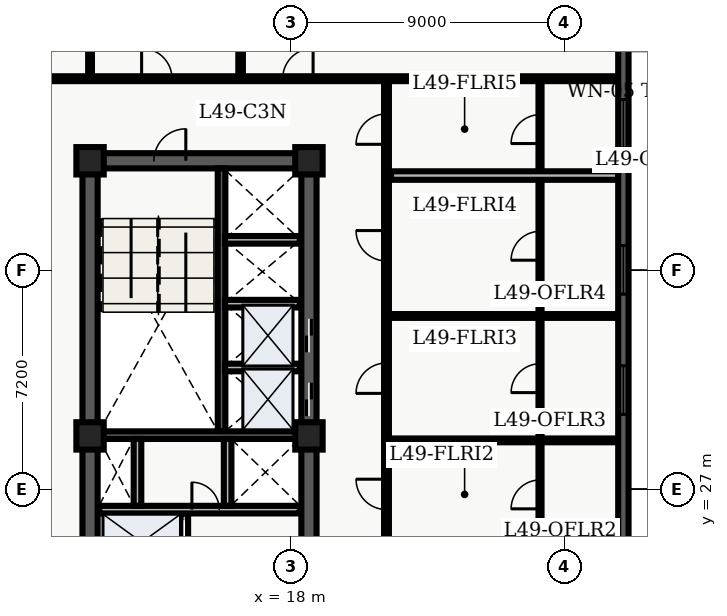
"""IFC4 building model, lengths in metres.
Left out: names, types, materials, properties, quantities, classifications, styles, units other than length and angle.
Written with IfcOpenShell. Run it as: python <this file> out.ifc"""

import sys

from ifc_helpers import new_model, entity, si_unit, converted_unit, direction, frame, origin_with_axes, origin_2d_with_axis, place, context, subcontext, project, spatial, polyline, rectangle, outline, extrude, element, fill, save


model = new_model("IFC4")
c1 = context("Model", 3, precision=1e-05, world=origin_with_axes(), true_north=direction((0.0, 1.0)))
c2 = subcontext(c1, "Body", "Model", "MODEL_VIEW")
j1 = project(units=[si_unit("LENGTHUNIT", "METRE"), converted_unit("PLANEANGLEUNIT", "DEGREE", entity("IfcPlaneAngleMeasure", 0.017), si_unit("PLANEANGLEUNIT", "RADIAN"), dimensions=[0, 0, 0, 0, 0, 0, 0])], contexts=[c1])
p1 = place(None, origin_with_axes())
s1 = spatial("IfcSite", under=j1, at=p1, CompositionType="ELEMENT")
p2 = place(p1, origin_with_axes())
s2 = spatial("IfcBuilding", under=s1, at=p2, CompositionType="ELEMENT")
p3 = place(p2, frame((0.0, 0.0, 200.4), z_axis=(0.0, 0.0, 1.0), x_axis=(1.0, 0.0, 0.0)))
s3 = spatial("IfcBuildingStorey", under=s2, at=p3, CompositionType="ELEMENT", Elevation=200.4)
p4 = place(p3, frame((11.4, 10.8, 0.0), z_axis=(0.0, 0.0, 1.0), x_axis=(0.0, 1.0, 0.0)))
e1 = element("IfcWall", 1, at=p4, inside=s3, PredefinedType="SHEAR", context=c2, shape_type="SweptSolid", body=[
    extrude(outline(polyline([(0.0, -0.25), (27.0, -0.25), (27.0, 0.25), (0.0, 0.25), (0.0, -0.25)])), origin_with_axes(), (0.0, 0.0, 1.0), 3.66),
])
p5 = place(p3, frame((11.4, 37.8, 0.0), z_axis=(0.0, 0.0, 1.0), x_axis=(1.0, 0.0, 0.0)))
e2 = element("IfcWall", 2, at=p5, inside=s3, PredefinedType="SHEAR", context=c2, shape_type="SweptSolid", body=[
    extrude(outline(polyline([(0.0, -0.25), (7.2, -0.25), (7.2, 0.25), (0.0, 0.25), (0.0, -0.25)])), origin_with_axes(), (0.0, 0.0, 1.0), 3.66),
])
p6 = place(p5, frame((2.625, 0.0, 0.0), z_axis=(0.0, 0.0, 1.0), x_axis=(1.0, 0.0, 0.0)))
e3 = element("IfcOpeningElement", 3, at=p6, cuts=e2, PredefinedType="OPENING", context=c2, shape_type="SweptSolid", body=[
    extrude(rectangle(XDim=1.05, YDim=0.52, at=origin_2d_with_axis()), origin_with_axes(), (0.0, 0.0, 1.0), 2.15),
])
p7 = place(p3, frame((18.6, 24.3, 0.0), z_axis=(0.0, 0.0, 1.0), x_axis=(0.0, 1.0, 0.0)))
e4 = element("IfcWall", 4, at=p7, inside=s3, PredefinedType="SHEAR", context=c2, shape_type="SweptSolid", body=[
    extrude(outline(polyline([(0.0, -0.25), (13.5, -0.25), (13.5, 0.25), (0.0, 0.25), (0.0, -0.25)])), origin_with_axes(), (0.0, 0.0, 1.0), 3.66),
])
p8 = place(p7, frame((5.65, 0.0, 0.0), z_axis=(0.0, 0.0, 1.0), x_axis=(1.0, 0.0, 0.0)))
e5 = element("IfcOpeningElement", 5, at=p8, cuts=e4, PredefinedType="OPENING", context=c2, shape_type="SweptSolid", body=[
    extrude(rectangle(XDim=1.1, YDim=0.52, at=origin_2d_with_axis()), origin_with_axes(), (0.0, 0.0, 1.0), 2.15),
])
p9 = place(p7, frame((7.75, 0.0, 0.0), z_axis=(0.0, 0.0, 1.0), x_axis=(1.0, 0.0, 0.0)))
e6 = element("IfcOpeningElement", 6, at=p9, cuts=e4, PredefinedType="OPENING", context=c2, shape_type="SweptSolid", body=[
    extrude(rectangle(XDim=1.1, YDim=0.52, at=origin_2d_with_axis()), origin_with_axes(), (0.0, 0.0, 1.0), 2.15),
])
p10 = place(p3, frame((15.725, 28.9, 0.0), z_axis=(0.0, 0.0, 1.0), x_axis=(0.0, 1.0, 0.0)))
e7 = element("IfcWall", 7, at=p10, inside=s3, PredefinedType="SHEAR", context=c2, shape_type="SweptSolid", body=[
    extrude(outline(polyline([(0.0, -0.125), (8.65, -0.125), (8.65, 0.125), (0.0, 0.125), (0.0, -0.125)])), origin_with_axes(), (0.0, 0.0, 1.0), 3.66),
])
p11 = place(p3, frame((11.65, 28.775, 0.0), z_axis=(0.0, 0.0, 1.0), x_axis=(1.0, 0.0, 0.0)))
e8 = element("IfcWall", 8, at=p11, inside=s3, PredefinedType="SHEAR", context=c2, shape_type="SweptSolid", body=[
    extrude(outline(polyline([(0.0, -0.125), (6.7, -0.125), (6.7, 0.125), (0.0, 0.125), (0.0, -0.125)])), origin_with_axes(), (0.0, 0.0, 1.0), 3.66),
])
p12 = place(p3, frame((14.5, 19.95, 0.0), z_axis=(0.0, 0.0, 1.0), x_axis=(0.0, 1.0, 0.0)))
e9 = element("IfcWall", 9, at=p12, inside=s3, PredefinedType="SOLIDWALL", context=c2, shape_type="SweptSolid", body=[
    extrude(outline(polyline([(0.0, -0.125), (6.25, -0.125), (6.25, 0.125), (0.0, 0.125), (0.0, -0.125)])), origin_with_axes(), (0.0, 0.0, 1.0), 2.7),
])
p13 = place(p12, frame((1.025, 0.0, 0.0), z_axis=(0.0, 0.0, 1.0), x_axis=(1.0, 0.0, 0.0)))
e10 = element("IfcOpeningElement", 10, at=p13, cuts=e9, PredefinedType="OPENING", context=c2, shape_type="SweptSolid", body=[
    extrude(rectangle(XDim=1.1, YDim=0.27, at=origin_2d_with_axis()), origin_with_axes(), (0.0, 0.0, 1.0), 2.15),
])
p14 = place(p12, frame((2.975, 0.0, 0.0), z_axis=(0.0, 0.0, 1.0), x_axis=(1.0, 0.0, 0.0)))
e11 = element("IfcOpeningElement", 11, at=p14, cuts=e9, PredefinedType="OPENING", context=c2, shape_type="SweptSolid", body=[
    extrude(rectangle(XDim=1.1, YDim=0.27, at=origin_2d_with_axis()), origin_with_axes(), (0.0, 0.0, 1.0), 2.15),
])
p15 = place(p12, frame((5.425, 0.0, 0.0), z_axis=(0.0, 0.0, 1.0), x_axis=(1.0, 0.0, 0.0)))
e12 = element("IfcOpeningElement", 12, at=p15, cuts=e9, PredefinedType="OPENING", context=c2, shape_type="SweptSolid", body=[
    extrude(rectangle(XDim=1.2, YDim=0.27, at=origin_2d_with_axis()), origin_with_axes(), (0.0, 0.0, 1.0), 2.15),
])
p16 = place(p3, frame((11.7, 26.325, 0.0), z_axis=(0.0, 0.0, 1.0), x_axis=(1.0, 0.0, 0.0)))
e13 = element("IfcWall", 13, at=p16, inside=s3, PredefinedType="SOLIDWALL", context=c2, shape_type="SweptSolid", body=[
    extrude(outline(polyline([(0.0, -0.125), (6.6, -0.125), (6.6, 0.125), (0.0, 0.125), (0.0, -0.125)])), origin_with_axes(), (0.0, 0.0, 1.0), 2.7),
])
p17 = place(p16, frame((3.5, 0.0, 0.0), z_axis=(0.0, 0.0, 1.0), x_axis=(1.0, 0.0, 0.0)))
e14 = element("IfcOpeningElement", 14, at=p17, cuts=e13, PredefinedType="OPENING", context=c2, shape_type="SweptSolid", body=[
    extrude(rectangle(XDim=0.9, YDim=0.27, at=origin_2d_with_axis()), origin_with_axes(), (0.0, 0.0, 1.0), 2.15),
])
for number, where, z_axis, x_axis in (
    (15, (12.96, 26.45, 0.0), (0.0, 0.0, 1.0), (0.0, 1.0, 0.0)),
    (16, (15.925, 26.45, 0.0), (0.0, 0.0, 1.0), (0.0, 1.0, 0.0)),
):
    element("IfcWall", number, at=place(p3, frame(where, z_axis=z_axis, x_axis=x_axis)), inside=s3, PredefinedType="SOLIDWALL", context=c2, shape_type="SweptSolid", body=[
        extrude(outline(polyline([(0.0, -0.125), (2.2, -0.125), (2.2, 0.125), (0.0, 0.125), (0.0, -0.125)])), origin_with_axes(), (0.0, 0.0, 1.0), 2.7),
    ])
for number, where, z_axis, x_axis in (
    (17, (11.4, 28.75, 0.0), (0.0, 0.0, 1.0), (1.0, 0.0, 0.0)),
    (18, (11.4, 37.8, 0.0), (0.0, 0.0, 1.0), (1.0, 0.0, 0.0)),
    (19, (18.6, 28.75, 0.0), (0.0, 0.0, 1.0), (1.0, 0.0, 0.0)),
    (20, (18.6, 37.8, 0.0), (0.0, 0.0, 1.0), (1.0, 0.0, 0.0)),
):
    element("IfcColumn", number, at=place(p3, frame(where, z_axis=z_axis, x_axis=x_axis)), inside=s3, PredefinedType="COLUMN", context=c2, shape_type="SweptSolid", body=[
        extrude(rectangle(XDim=0.9, YDim=0.9, at=origin_2d_with_axis()), origin_with_axes(), (0.0, 0.0, 1.0), 3.9),
    ])
for number, where, z_axis, x_axis in (
    (21, (15.84, 31.0, 0.0), (0.0, 0.0, 1.0), (1.0, 0.0, 0.0)),
    (22, (15.84, 33.1, 0.0), (0.0, 0.0, 1.0), (1.0, 0.0, 0.0)),
    (23, (15.84, 35.2, 0.0), (0.0, 0.0, 1.0), (1.0, 0.0, 0.0)),
):
    element("IfcWall", number, at=place(p3, frame(where, z_axis=z_axis, x_axis=x_axis)), inside=s3, PredefinedType="SOLIDWALL", context=c2, shape_type="SweptSolid", body=[
        extrude(outline(polyline([(0.0, -0.125), (2.46, -0.125), (2.46, 0.125), (0.0, 0.125), (0.0, -0.125)])), origin_with_axes(), (0.0, 0.0, 1.0), 2.7),
    ])
p18 = place(p3, frame((2.6, 40.5, 0.0), z_axis=(0.0, 0.0, 1.0), x_axis=(1.0, 0.0, 0.0)))
e24 = element("IfcWall", 24, at=p18, inside=s3, PredefinedType="PARTITIONING", context=c2, shape_type="SweptSolid", body=[
    extrude(outline(polyline([(0.0, -0.08), (26.177, -0.08), (26.177, 0.08), (0.0, 0.08), (0.0, -0.08)])), origin_with_axes(), (0.0, 0.0, 1.0), 2.7),
])
p19 = place(p18, frame((1.554, 0.0, 0.0), z_axis=(0.0, 0.0, 1.0), x_axis=(1.0, 0.0, 0.0)))
e25 = element("IfcOpeningElement", 25, at=p19, cuts=e24, PredefinedType="OPENING", context=c2, shape_type="SweptSolid", body=[
    extrude(rectangle(XDim=1.0, YDim=0.18, at=origin_2d_with_axis()), origin_with_axes(), (0.0, 0.0, 1.0), 2.15),
])
p20 = place(p18, frame((6.84, 0.0, 0.0), z_axis=(0.0, 0.0, 1.0), x_axis=(1.0, 0.0, 0.0)))
e26 = element("IfcOpeningElement", 26, at=p20, cuts=e24, PredefinedType="OPENING", context=c2, shape_type="SweptSolid", body=[
    extrude(rectangle(XDim=1.0, YDim=0.18, at=origin_2d_with_axis()), origin_with_axes(), (0.0, 0.0, 1.0), 2.15),
])
p21 = place(p18, frame((10.996, 0.0, 0.0), z_axis=(0.0, 0.0, 1.0), x_axis=(1.0, 0.0, 0.0)))
e27 = element("IfcOpeningElement", 27, at=p21, cuts=e24, PredefinedType="OPENING", context=c2, shape_type="SweptSolid", body=[
    extrude(rectangle(XDim=1.0, YDim=0.18, at=origin_2d_with_axis()), origin_with_axes(), (0.0, 0.0, 1.0), 2.15),
])
p22 = place(p18, frame((15.636, 0.0, 0.0), z_axis=(0.0, 0.0, 1.0), x_axis=(1.0, 0.0, 0.0)))
e28 = element("IfcOpeningElement", 28, at=p22, cuts=e24, PredefinedType="OPENING", context=c2, shape_type="SweptSolid", body=[
    extrude(rectangle(XDim=1.0, YDim=0.18, at=origin_2d_with_axis()), origin_with_axes(), (0.0, 0.0, 1.0), 2.15),
])
p23 = place(p3, frame((21.15, 7.8, 0.0), z_axis=(0.0, 0.0, 1.0), x_axis=(0.0, 1.0, 0.0)))
e29 = element("IfcWall", 29, at=p23, inside=s3, PredefinedType="PARTITIONING", context=c2, shape_type="SweptSolid", body=[
    extrude(outline(polyline([(0.0, -0.08), (32.7, -0.08), (32.7, 0.08), (0.0, 0.08), (0.0, -0.08)])), origin_with_axes(), (0.0, 0.0, 1.0), 2.7),
])
p24 = place(p23, frame((15.589, 0.0, 0.0), z_axis=(0.0, 0.0, 1.0), x_axis=(1.0, 0.0, 0.0)))
e30 = element("IfcOpeningElement", 30, at=p24, cuts=e29, PredefinedType="OPENING", context=c2, shape_type="SweptSolid", body=[
    extrude(rectangle(XDim=1.0, YDim=0.18, at=origin_2d_with_axis()), origin_with_axes(), (0.0, 0.0, 1.0), 2.15),
])
p25 = place(p23, frame((19.026, 0.0, 0.0), z_axis=(0.0, 0.0, 1.0), x_axis=(1.0, 0.0, 0.0)))
e31 = element("IfcOpeningElement", 31, at=p25, cuts=e29, PredefinedType="OPENING", context=c2, shape_type="SweptSolid", body=[
    extrude(rectangle(XDim=1.0, YDim=0.18, at=origin_2d_with_axis()), origin_with_axes(), (0.0, 0.0, 1.0), 2.15),
])
p26 = place(p23, frame((22.849, 0.0, 0.0), z_axis=(0.0, 0.0, 1.0), x_axis=(1.0, 0.0, 0.0)))
e32 = element("IfcOpeningElement", 32, at=p26, cuts=e29, PredefinedType="OPENING", context=c2, shape_type="SweptSolid", body=[
    extrude(rectangle(XDim=1.0, YDim=0.18, at=origin_2d_with_axis()), origin_with_axes(), (0.0, 0.0, 1.0), 2.15),
])
p27 = place(p23, frame((27.204, 0.0, 0.0), z_axis=(0.0, 0.0, 1.0), x_axis=(1.0, 0.0, 0.0)))
e33 = element("IfcOpeningElement", 33, at=p27, cuts=e29, PredefinedType="OPENING", context=c2, shape_type="SweptSolid", body=[
    extrude(rectangle(XDim=1.0, YDim=0.18, at=origin_2d_with_axis()), origin_with_axes(), (0.0, 0.0, 1.0), 2.15),
])
p28 = place(p23, frame((31.042, 0.0, 0.0), z_axis=(0.0, 0.0, 1.0), x_axis=(1.0, 0.0, 0.0)))
e34 = element("IfcOpeningElement", 34, at=p28, cuts=e29, PredefinedType="OPENING", context=c2, shape_type="SweptSolid", body=[
    extrude(rectangle(XDim=1.0, YDim=0.18, at=origin_2d_with_axis()), origin_with_axes(), (0.0, 0.0, 1.0), 2.15),
])
p29 = place(p23, frame((5.775, 0.0, 0.0), z_axis=(0.0, 0.0, 1.0), x_axis=(1.0, 0.0, 0.0)))
e35 = element("IfcOpeningElement", 35, at=p29, cuts=e29, PredefinedType="OPENING", context=c2, shape_type="SweptSolid", body=[
    extrude(rectangle(XDim=1.05, YDim=0.18, at=origin_2d_with_axis()), origin_with_axes(), (0.0, 0.0, 1.0), 2.15),
])
p30 = place(p3, frame((11.4, 40.6, 0.0), z_axis=(0.0, 0.0, 1.0), x_axis=(0.0, 1.0, 0.0)))
e36 = element("IfcWall", 36, at=p30, inside=s3, PredefinedType="PARTITIONING", context=c2, shape_type="SweptSolid", body=[
    extrude(outline(polyline([(0.0, -0.062), (7.665, -0.062), (7.665, 0.062), (0.0, 0.062), (0.0, -0.062)])), origin_with_axes(), (0.0, 0.0, 1.0), 2.7),
])
p31 = place(p3, frame((16.352, 40.6, 0.0), z_axis=(0.0, 0.0, 1.0), x_axis=(0.0, 1.0, 0.0)))
e37 = element("IfcWall", 37, at=p31, inside=s3, PredefinedType="PARTITIONING", context=c2, shape_type="SweptSolid", body=[
    extrude(outline(polyline([(0.0, -0.075), (7.665, -0.075), (7.665, 0.075), (0.0, 0.075), (0.0, -0.075)])), origin_with_axes(), (0.0, 0.0, 1.0), 2.7),
])
p32 = place(p3, frame((26.2, 21.8, 0.0), z_axis=(0.0, 0.0, 1.0), x_axis=(0.0, 1.0, 0.0)))
e38 = element("IfcWall", 38, at=p32, inside=s3, PredefinedType="PARTITIONING", context=c2, shape_type="SweptSolid", body=[
    extrude(outline(polyline([(0.0, -0.05), (18.5, -0.05), (18.5, 0.05), (0.0, 0.05), (0.0, -0.05)])), origin_with_axes(), (0.0, 0.0, 1.0), 2.7),
])
p33 = place(p32, frame((1.589, 0.0, 0.0), z_axis=(0.0, 0.0, 1.0), x_axis=(1.0, 0.0, 0.0)))
e39 = element("IfcOpeningElement", 39, at=p33, cuts=e38, PredefinedType="OPENING", context=c2, shape_type="SweptSolid", body=[
    extrude(rectangle(XDim=0.95, YDim=0.12, at=origin_2d_with_axis()), origin_with_axes(), (0.0, 0.0, 1.0), 2.15),
])
p34 = place(p32, frame((5.026, 0.0, 0.0), z_axis=(0.0, 0.0, 1.0), x_axis=(1.0, 0.0, 0.0)))
e40 = element("IfcOpeningElement", 40, at=p34, cuts=e38, PredefinedType="OPENING", context=c2, shape_type="SweptSolid", body=[
    extrude(rectangle(XDim=0.95, YDim=0.12, at=origin_2d_with_axis()), origin_with_axes(), (0.0, 0.0, 1.0), 2.15),
])
p35 = place(p32, frame((8.849, 0.0, 0.0), z_axis=(0.0, 0.0, 1.0), x_axis=(1.0, 0.0, 0.0)))
e41 = element("IfcOpeningElement", 41, at=p35, cuts=e38, PredefinedType="OPENING", context=c2, shape_type="SweptSolid", body=[
    extrude(rectangle(XDim=0.95, YDim=0.12, at=origin_2d_with_axis()), origin_with_axes(), (0.0, 0.0, 1.0), 2.15),
])
p36 = place(p32, frame((13.204, 0.0, 0.0), z_axis=(0.0, 0.0, 1.0), x_axis=(1.0, 0.0, 0.0)))
e42 = element("IfcOpeningElement", 42, at=p36, cuts=e38, PredefinedType="OPENING", context=c2, shape_type="SweptSolid", body=[
    extrude(rectangle(XDim=0.95, YDim=0.12, at=origin_2d_with_axis()), origin_with_axes(), (0.0, 0.0, 1.0), 2.15),
])
p37 = place(p32, frame((17.042, 0.0, 0.0), z_axis=(0.0, 0.0, 1.0), x_axis=(1.0, 0.0, 0.0)))
e43 = element("IfcOpeningElement", 43, at=p37, cuts=e38, PredefinedType="OPENING", context=c2, shape_type="SweptSolid", body=[
    extrude(rectangle(XDim=0.95, YDim=0.12, at=origin_2d_with_axis()), origin_with_axes(), (0.0, 0.0, 1.0), 2.15),
])
for number, where, z_axis, x_axis in (
    (44, (21.3, 28.603, 0.0), (0.0, 0.0, 1.0), (1.0, 0.0, 0.0)),
    (45, (21.3, 32.695, 0.0), (0.0, 0.0, 1.0), (1.0, 0.0, 0.0)),
):
    element("IfcWall", number, at=place(p3, frame(where, z_axis=z_axis, x_axis=x_axis)), inside=s3, PredefinedType="PARTITIONING", context=c2, shape_type="SweptSolid", body=[
        extrude(outline(polyline([(0.0, -0.062), (7.477, -0.062), (7.477, 0.062), (0.0, 0.062), (0.0, -0.062)])), origin_with_axes(), (0.0, 0.0, 1.0), 2.7),
    ])
p38 = place(p3, frame((21.3, 37.314, 0.0), z_axis=(0.0, 0.0, 1.0), x_axis=(1.0, 0.0, 0.0)))
e46 = element("IfcWall", 46, at=p38, inside=s3, PredefinedType="PARTITIONING", context=c2, shape_type="SweptSolid", body=[
    extrude(outline(polyline([(0.0, -0.14), (7.477, -0.14), (7.477, 0.14), (0.0, 0.14), (0.0, -0.14)])), origin_with_axes(), (0.0, 0.0, 1.0), 2.7),
])
p39 = place(p3, frame((28.942, 42.02, 0.0), z_axis=(0.0, 0.0, 1.0), x_axis=(0.0, -1.0, 0.0)))
e47 = element("IfcWall", 47, at=p39, inside=s3, PredefinedType="SOLIDWALL", context=c2, shape_type="SweptSolid", body=[
    extrude(outline(polyline([(0.0, -0.17), (20.42, -0.17), (20.42, 0.17), (0.0, 0.17), (0.0, -0.17)])), origin_with_axes(), (0.0, 0.0, 1.0), 3.66),
])
p40 = place(p39, frame((3.003, 0.0, 0.45), z_axis=(0.0, 0.0, 1.0), x_axis=(1.0, 0.0, 0.0)))
e48 = element("IfcOpeningElement", 48, at=p40, cuts=e47, PredefinedType="OPENING", context=c2, shape_type="SweptSolid", body=[
    extrude(rectangle(XDim=1.6, YDim=0.36, at=origin_2d_with_axis()), origin_with_axes(), (0.0, 0.0, 1.0), 2.2),
])
p41 = place(p39, frame((7.808, 0.0, 0.45), z_axis=(0.0, 0.0, 1.0), x_axis=(1.0, 0.0, 0.0)))
e49 = element("IfcOpeningElement", 49, at=p41, cuts=e47, PredefinedType="OPENING", context=c2, shape_type="SweptSolid", body=[
    extrude(rectangle(XDim=1.6, YDim=0.36, at=origin_2d_with_axis()), origin_with_axes(), (0.0, 0.0, 1.0), 2.2),
])
p42 = place(p39, frame((11.762, 0.0, 0.45), z_axis=(0.0, 0.0, 1.0), x_axis=(1.0, 0.0, 0.0)))
e50 = element("IfcOpeningElement", 50, at=p42, cuts=e47, PredefinedType="OPENING", context=c2, shape_type="SweptSolid", body=[
    extrude(rectangle(XDim=1.6, YDim=0.36, at=origin_2d_with_axis()), origin_with_axes(), (0.0, 0.0, 1.0), 2.2),
])
p43 = place(p7, frame((5.65, 0.0, 0.0), z_axis=(0.0, 0.0, 1.0), x_axis=(1.0, 0.0, 0.0)))
e51 = element("IfcDoor", 51, at=p43, inside=s3, OperationType="SLIDING_TO_LEFT", PredefinedType="DOOR", context=c2, shape_type="SweptSolid", body=[
    extrude(rectangle(XDim=1.1, YDim=0.09, at=origin_2d_with_axis()), origin_with_axes(), (0.0, 0.0, 1.0), 2.15),
])
fill(e5, e51)
p44 = place(p7, frame((7.75, 0.0, 0.0), z_axis=(0.0, 0.0, 1.0), x_axis=(1.0, 0.0, 0.0)))
e52 = element("IfcDoor", 52, at=p44, inside=s3, OperationType="SLIDING_TO_RIGHT", PredefinedType="DOOR", context=c2, shape_type="SweptSolid", body=[
    extrude(rectangle(XDim=1.1, YDim=0.09, at=origin_2d_with_axis()), origin_with_axes(), (0.0, 0.0, 1.0), 2.15),
])
fill(e6, e52)
p45 = place(p12, frame((5.425, 0.0, 0.0), z_axis=(0.0, 0.0, 1.0), x_axis=(1.0, 0.0, 0.0)))
e53 = element("IfcDoor", 53, at=p45, inside=s3, OperationType="DOUBLE_DOOR_SLIDING", PredefinedType="DOOR", context=c2, shape_type="SweptSolid", body=[
    extrude(rectangle(XDim=1.2, YDim=0.09, at=origin_2d_with_axis()), origin_with_axes(), (0.0, 0.0, 1.0), 2.15),
])
fill(e12, e53)
p46 = place(p5, frame((2.625, 0.0, 0.0), z_axis=(0.0, 0.0, 1.0), x_axis=(1.0, 0.0, 0.0)))
e54 = element("IfcDoor", 54, at=p46, inside=s3, OperationType="SINGLE_SWING_RIGHT", PredefinedType="DOOR", context=c2, shape_type="SweptSolid", body=[
    extrude(rectangle(XDim=1.05, YDim=0.09, at=origin_2d_with_axis()), origin_with_axes(), (0.0, 0.0, 1.0), 2.15),
])
fill(e3, e54)
p47 = place(p16, frame((3.5, 0.0, 0.0), z_axis=(0.0, 0.0, 1.0), x_axis=(1.0, 0.0, 0.0)))
e55 = element("IfcDoor", 55, at=p47, inside=s3, OperationType="SINGLE_SWING_LEFT", PredefinedType="DOOR", context=c2, shape_type="SweptSolid", body=[
    extrude(rectangle(XDim=0.9, YDim=0.09, at=origin_2d_with_axis()), origin_with_axes(), (0.0, 0.0, 1.0), 2.15),
])
fill(e14, e55)
p48 = place(p18, frame((10.996, 0.0, 0.0), z_axis=(0.0, 0.0, 1.0), x_axis=(1.0, 0.0, 0.0)))
e56 = element("IfcDoor", 56, at=p48, inside=s3, OperationType="SINGLE_SWING_LEFT", PredefinedType="DOOR", context=c2, shape_type="SweptSolid", body=[
    extrude(rectangle(XDim=1.0, YDim=0.09, at=origin_2d_with_axis()), origin_with_axes(), (0.0, 0.0, 1.0), 2.15),
])
fill(e27, e56)
p49 = place(p18, frame((15.636, 0.0, 0.0), z_axis=(0.0, 0.0, 1.0), x_axis=(1.0, 0.0, 0.0)))
e57 = element("IfcDoor", 57, at=p49, inside=s3, OperationType="SINGLE_SWING_RIGHT", PredefinedType="DOOR", context=c2, shape_type="SweptSolid", body=[
    extrude(rectangle(XDim=1.0, YDim=0.09, at=origin_2d_with_axis()), origin_with_axes(), (0.0, 0.0, 1.0), 2.15),
])
fill(e28, e57)
p50 = place(p32, frame((5.026, 0.0, 0.0), z_axis=(0.0, 0.0, 1.0), x_axis=(1.0, 0.0, 0.0)))
e58 = element("IfcDoor", 58, at=p50, inside=s3, OperationType="SINGLE_SWING_LEFT", PredefinedType="DOOR", context=c2, shape_type="SweptSolid", body=[
    extrude(rectangle(XDim=0.95, YDim=0.06, at=origin_2d_with_axis()), origin_with_axes(), (0.0, 0.0, 1.0), 2.15),
])
fill(e40, e58)
p51 = place(p23, frame((19.026, 0.0, 0.0), z_axis=(0.0, 0.0, 1.0), x_axis=(1.0, 0.0, 0.0)))
e59 = element("IfcDoor", 59, at=p51, inside=s3, OperationType="SINGLE_SWING_RIGHT", PredefinedType="DOOR", context=c2, shape_type="SweptSolid", body=[
    extrude(rectangle(XDim=1.0, YDim=0.09, at=origin_2d_with_axis()), origin_with_axes(), (0.0, 0.0, 1.0), 2.15),
])
fill(e31, e59)
p52 = place(p32, frame((8.849, 0.0, 0.0), z_axis=(0.0, 0.0, 1.0), x_axis=(1.0, 0.0, 0.0)))
e60 = element("IfcDoor", 60, at=p52, inside=s3, OperationType="SINGLE_SWING_LEFT", PredefinedType="DOOR", context=c2, shape_type="SweptSolid", body=[
    extrude(rectangle(XDim=0.95, YDim=0.06, at=origin_2d_with_axis()), origin_with_axes(), (0.0, 0.0, 1.0), 2.15),
])
fill(e41, e60)
p53 = place(p23, frame((22.849, 0.0, 0.0), z_axis=(0.0, 0.0, 1.0), x_axis=(1.0, 0.0, 0.0)))
e61 = element("IfcDoor", 61, at=p53, inside=s3, OperationType="SINGLE_SWING_LEFT", PredefinedType="DOOR", context=c2, shape_type="SweptSolid", body=[
    extrude(rectangle(XDim=1.0, YDim=0.09, at=origin_2d_with_axis()), origin_with_axes(), (0.0, 0.0, 1.0), 2.15),
])
fill(e32, e61)
p54 = place(p32, frame((13.204, 0.0, 0.0), z_axis=(0.0, 0.0, 1.0), x_axis=(1.0, 0.0, 0.0)))
e62 = element("IfcDoor", 62, at=p54, inside=s3, OperationType="SINGLE_SWING_LEFT", PredefinedType="DOOR", context=c2, shape_type="SweptSolid", body=[
    extrude(rectangle(XDim=0.95, YDim=0.06, at=origin_2d_with_axis()), origin_with_axes(), (0.0, 0.0, 1.0), 2.15),
])
fill(e42, e62)
p55 = place(p23, frame((27.204, 0.0, 0.0), z_axis=(0.0, 0.0, 1.0), x_axis=(1.0, 0.0, 0.0)))
e63 = element("IfcDoor", 63, at=p55, inside=s3, OperationType="SINGLE_SWING_RIGHT", PredefinedType="DOOR", context=c2, shape_type="SweptSolid", body=[
    extrude(rectangle(XDim=1.0, YDim=0.09, at=origin_2d_with_axis()), origin_with_axes(), (0.0, 0.0, 1.0), 2.15),
])
fill(e33, e63)
p56 = place(p32, frame((17.042, 0.0, 0.0), z_axis=(0.0, 0.0, 1.0), x_axis=(1.0, 0.0, 0.0)))
e64 = element("IfcDoor", 64, at=p56, inside=s3, OperationType="SINGLE_SWING_LEFT", PredefinedType="DOOR", context=c2, shape_type="SweptSolid", body=[
    extrude(rectangle(XDim=0.95, YDim=0.06, at=origin_2d_with_axis()), origin_with_axes(), (0.0, 0.0, 1.0), 2.15),
])
fill(e43, e64)
p57 = place(p23, frame((31.042, 0.0, 0.0), z_axis=(0.0, 0.0, 1.0), x_axis=(1.0, 0.0, 0.0)))
e65 = element("IfcDoor", 65, at=p57, inside=s3, OperationType="SINGLE_SWING_LEFT", PredefinedType="DOOR", context=c2, shape_type="SweptSolid", body=[
    extrude(rectangle(XDim=1.0, YDim=0.09, at=origin_2d_with_axis()), origin_with_axes(), (0.0, 0.0, 1.0), 2.15),
])
fill(e34, e65)
p58 = place(p39, frame((3.003, 0.0, 0.45), z_axis=(0.0, 0.0, 1.0), x_axis=(1.0, 0.0, 0.0)))
e66 = element("IfcWindow", 66, at=p58, inside=s3, PredefinedType="WINDOW", context=c2, shape_type="SweptSolid", body=[
    extrude(rectangle(XDim=1.6, YDim=0.09, at=origin_2d_with_axis()), origin_with_axes(), (0.0, 0.0, 1.0), 2.2),
])
fill(e48, e66)
p59 = place(p39, frame((7.808, 0.0, 0.45), z_axis=(0.0, 0.0, 1.0), x_axis=(1.0, 0.0, 0.0)))
e67 = element("IfcWindow", 67, at=p59, inside=s3, PredefinedType="WINDOW", context=c2, shape_type="SweptSolid", body=[
    extrude(rectangle(XDim=1.6, YDim=0.09, at=origin_2d_with_axis()), origin_with_axes(), (0.0, 0.0, 1.0), 2.2),
])
fill(e49, e67)
p60 = place(p39, frame((11.762, 0.0, 0.45), z_axis=(0.0, 0.0, 1.0), x_axis=(1.0, 0.0, 0.0)))
e68 = element("IfcWindow", 68, at=p60, inside=s3, PredefinedType="WINDOW", context=c2, shape_type="SweptSolid", body=[
    extrude(rectangle(XDim=1.6, YDim=0.09, at=origin_2d_with_axis()), origin_with_axes(), (0.0, 0.0, 1.0), 2.2),
])
fill(e50, e68)
save(model, sys.argv[1])
